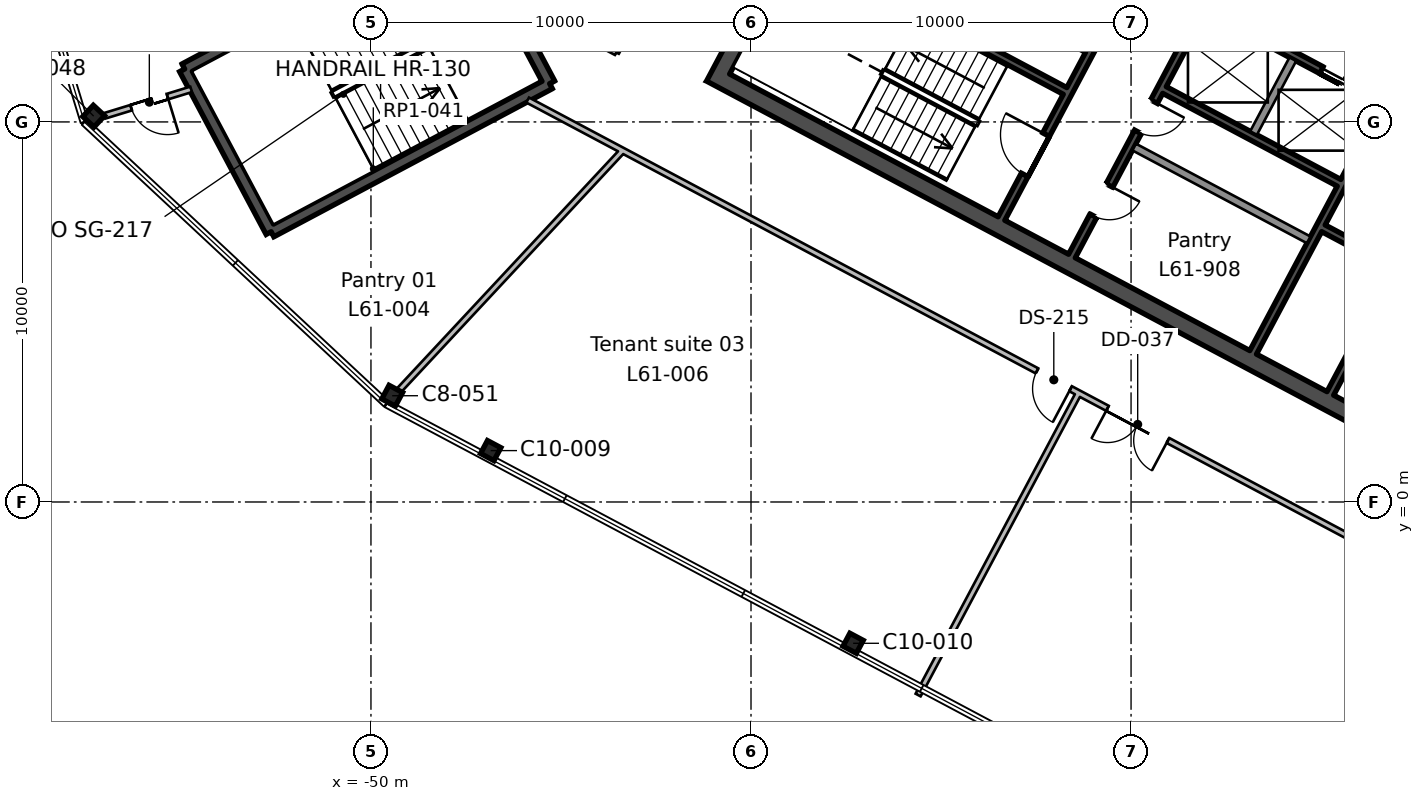
"""IFC4 building model, lengths in metres.
Left out: names, types, materials, properties, quantities, classifications, styles, units other than length and angle.
Written with IfcOpenShell. Run it as: python <this file> out.ifc"""

import sys

from ifc_helpers import new_model, si_unit, direction, frame, frame_2d, origin, origin_2d, place, context, subcontext, project, spatial, rectangle, i_section, extrude, element, fill, save


model = new_model("IFC4")
c1 = context("Model", 3, precision=1e-05, world=origin(), true_north=direction((0.0, 1.0)))
c2 = subcontext(c1, "Body", "Model", "MODEL_VIEW")
j1 = project(units=[si_unit("LENGTHUNIT", "METRE"), si_unit("PLANEANGLEUNIT", "RADIAN")], contexts=[c1])
p1 = place(None, origin())
s1 = spatial("IfcSite", under=j1, at=p1, CompositionType="ELEMENT")
p2 = place(p1, origin())
s2 = spatial("IfcBuilding", under=s1, at=p2, CompositionType="ELEMENT")
p3 = place(p2, frame((0.0, 0.0, 273.6)))
s3 = spatial("IfcBuildingStorey", under=s2, at=p3, CompositionType="ELEMENT", Elevation=273.6)
for number, where, z_axis, x_axis in (
    (1, (-37.313, -3.718, 0.0), (0.0, 0.0, 1.0), (0.883, -0.469, 0.0)),
    (2, (-46.849, 1.352, 0.0), (0.0, 0.0, 1.0), (0.883, -0.469, 0.0)),
):
    element("IfcColumn", number, at=place(p3, frame(where, z_axis=z_axis, x_axis=x_axis)), inside=s3, PredefinedType="COLUMN", context=c2, shape_type="SweptSolid", body=[
        extrude(i_section(OverallWidth=0.399, OverallDepth=0.386, WebThickness=0.021, FlangeThickness=0.033, FilletRadius=0.015, at=origin_2d()), origin(), (0.0, 0.0, 1.0), 3.9),
    ])
for number, where, z_axis, x_axis in (
    (3, (-49.441, 2.796, 0.0), (0.0, 0.0, 1.0), (0.883, -0.469, 0.0)),
    (4, (-57.296, 10.152, 0.0), (0.0, 0.0, 1.0), (0.731, -0.682, 0.0)),
):
    element("IfcColumn", number, at=place(p3, frame(where, z_axis=z_axis, x_axis=x_axis)), inside=s3, PredefinedType="COLUMN", context=c2, shape_type="SweptSolid", body=[
        extrude(i_section(OverallWidth=0.404, OverallDepth=0.406, WebThickness=0.027, FlangeThickness=0.044, FilletRadius=0.015, at=origin_2d()), origin(), (0.0, 0.0, 1.0), 3.9),
    ])
p4 = place(p3, frame((-32.004, 27.833, 0.0), z_axis=(0.0, 0.0, 1.0), x_axis=(-0.469467968382, -0.882949504028, 0.0)))
e5 = element("IfcWall", 5, at=p4, inside=s3, PredefinedType="SHEAR", context=c2, shape_type="SweptSolid", body=[
    extrude(rectangle(XDim=19.1, YDim=0.45, at=frame_2d((9.55, 0.0))), origin(), (0.0, 0.0, 1.0), 3.9),
])
p5 = place(p4, frame((10.15, 0.0, 0.0)))
e6 = element("IfcOpeningElement", 6, at=p5, cuts=e5, PredefinedType="OPENING", context=c2, shape_type="SweptSolid", body=[
    extrude(rectangle(XDim=2.4, YDim=2.4, at=frame_2d((1.2, 1.2))), frame((0.0, 0.235, 0.0), z_axis=(0.0, -1.0, 0.0), x_axis=(1.0, 0.0, 0.0)), (0.0, 0.0, 1.0), 0.47),
])
p6 = place(p3, frame((-22.832, 1.578, 0.0), z_axis=(0.0, 0.0, 1.0), x_axis=(-0.88294509198, 0.469476266226, 0.0)))
e7 = element("IfcWall", 7, at=p6, inside=s3, PredefinedType="SHEAR", context=c2, shape_type="SweptSolid", body=[
    extrude(rectangle(XDim=20.2, YDim=0.45, at=frame_2d((10.1, 0.0))), origin(), (0.0, 0.0, 1.0), 3.9),
])
p7 = place(p3, frame((-23.043, 6.08, 0.0), z_axis=(0.0, 0.0, 1.0), x_axis=(-0.469494272526, -0.882935517501, 0.0)))
e8 = element("IfcWall", 8, at=p7, inside=s3, PredefinedType="SHEAR", context=c2, shape_type="SweptSolid", body=[
    extrude(rectangle(XDim=3.65, YDim=0.2, at=frame_2d((1.825, 0.0))), origin(), (0.0, 0.0, 1.0), 3.9),
])
p8 = place(p3, frame((-23.36, 10.382, 0.0), z_axis=(0.0, 0.0, 1.0), x_axis=(-0.469480409012, -0.88294288918, 0.0)))
e9 = element("IfcWall", 9, at=p8, inside=s3, PredefinedType="SHEAR", context=c2, shape_type="SweptSolid", body=[
    extrude(rectangle(XDim=7.3, YDim=0.2, at=frame_2d((3.65, 0.0))), origin(), (0.0, 0.0, 1.0), 3.9),
])
p9 = place(p3, frame((-25.744, 11.65, 0.0), z_axis=(0.0, 0.0, 1.0), x_axis=(-0.469487830541, -0.882938942948, 0.0)))
e10 = element("IfcWall", 10, at=p9, inside=s3, PredefinedType="SOLIDWALL", context=c2, shape_type="SweptSolid", body=[
    extrude(rectangle(XDim=2.2, YDim=0.2, at=frame_2d((1.1, 0.0))), origin(), (0.0, 0.0, 1.0), 3.9),
])
p10 = place(p3, frame((-28.128, 12.917, 0.0), z_axis=(0.0, 0.0, 1.0), x_axis=(-0.469454336211, -0.882956752176, 0.0)))
e11 = element("IfcWall", 11, at=p10, inside=s3, PredefinedType="SHEAR", context=c2, shape_type="SweptSolid", body=[
    extrude(rectangle(XDim=7.3, YDim=0.2, at=frame_2d((3.65, 0.0))), origin(), (0.0, 0.0, 1.0), 3.9),
])
p11 = place(p10, frame((2.7, 0.0, 0.0)))
e12 = element("IfcOpeningElement", 12, at=p11, cuts=e11, PredefinedType="OPENING", context=c2, shape_type="SweptSolid", body=[
    extrude(rectangle(XDim=0.9, YDim=2.1, at=frame_2d((0.45, 1.05))), frame((0.0, 0.11, 0.0), z_axis=(0.0, -1.0, 0.0), x_axis=(1.0, 0.0, 0.0)), (0.0, 0.0, 1.0), 0.22),
])
p12 = place(p10, frame((5.2, 0.0, 0.0)))
e13 = element("IfcOpeningElement", 13, at=p12, cuts=e11, PredefinedType="OPENING", context=c2, shape_type="SweptSolid", body=[
    extrude(rectangle(XDim=0.9, YDim=2.1, at=frame_2d((0.45, 1.05))), frame((0.0, 0.11, 0.0), z_axis=(0.0, -1.0, 0.0), x_axis=(1.0, 0.0, 0.0)), (0.0, 0.0, 1.0), 0.22),
])
p13 = place(p3, frame((-29.982, 13.903, 0.0), z_axis=(0.0, 0.0, 1.0), x_axis=(-0.469454336211, -0.882956752176, 0.0)))
e14 = element("IfcWall", 14, at=p13, inside=s3, PredefinedType="SHEAR", context=c2, shape_type="SweptSolid", body=[
    extrude(rectangle(XDim=7.3, YDim=0.2, at=frame_2d((3.65, 0.0))), origin(), (0.0, 0.0, 1.0), 3.9),
])
p14 = place(p13, frame((4.8, 0.0, 0.0)))
e15 = element("IfcOpeningElement", 15, at=p14, cuts=e14, PredefinedType="OPENING", context=c2, shape_type="SweptSolid", body=[
    extrude(rectangle(XDim=1.2, YDim=2.1, at=frame_2d((0.6, 1.05))), frame((0.0, 0.11, 0.0), z_axis=(0.0, -1.0, 0.0), x_axis=(1.0, 0.0, 0.0)), (0.0, 0.0, 1.0), 0.22),
])
p15 = place(p3, frame((-19.252, 8.311, 0.0), z_axis=(0.0, 0.0, 1.0), x_axis=(-0.882955722218, 0.469456273365, 0.0)))
e16 = element("IfcWall", 16, at=p15, inside=s3, PredefinedType="SHEAR", context=c2, shape_type="SweptSolid", body=[
    extrude(rectangle(XDim=10.0, YDim=0.2, at=frame_2d((5.0, 0.0))), origin(), (0.0, 0.0, 1.0), 3.9),
])
p16 = place(p15, frame((2.1, 0.0, 0.0)))
e17 = element("IfcOpeningElement", 17, at=p16, cuts=e16, PredefinedType="OPENING", context=c2, shape_type="SweptSolid", body=[
    extrude(rectangle(XDim=1.2, YDim=2.1, at=frame_2d((0.6, 1.05))), frame((0.0, 0.11, 0.0), z_axis=(0.0, -1.0, 0.0), x_axis=(1.0, 0.0, 0.0)), (0.0, 0.0, 1.0), 0.22),
])
p17 = place(p15, frame((5.4, 0.0, 0.0)))
e18 = element("IfcOpeningElement", 18, at=p17, cuts=e16, PredefinedType="OPENING", context=c2, shape_type="SweptSolid", body=[
    extrude(rectangle(XDim=1.1, YDim=2.1, at=frame_2d((0.55, 1.05))), frame((0.0, 0.11, 0.0), z_axis=(0.0, -1.0, 0.0), x_axis=(1.0, 0.0, 0.0)), (0.0, 0.0, 1.0), 0.22),
])
p18 = place(p15, frame((8.1, 0.0, 0.0)))
e19 = element("IfcOpeningElement", 19, at=p18, cuts=e16, PredefinedType="OPENING", context=c2, shape_type="SweptSolid", body=[
    extrude(rectangle(XDim=1.1, YDim=2.1, at=frame_2d((0.55, 1.05))), frame((0.0, 0.11, 0.0), z_axis=(0.0, -1.0, 0.0), x_axis=(1.0, 0.0, 0.0)), (0.0, 0.0, 1.0), 0.22),
])
p19 = place(p3, frame((-24.528, 8.398, 0.0), z_axis=(0.0, 0.0, 1.0), x_axis=(-0.882953967957, 0.469459572775, 0.0)))
e20 = element("IfcWall", 20, at=p19, inside=s3, PredefinedType="SHEAR", context=c2, shape_type="SweptSolid", body=[
    extrude(rectangle(XDim=5.2, YDim=0.2, at=frame_2d((2.6, 0.0))), origin(), (0.0, 0.0, 1.0), 3.9),
])
p20 = place(p3, frame((-31.15, 11.919, 0.0), z_axis=(0.0, 0.0, 1.0), x_axis=(-0.882940221191, 0.469485426614, 0.0)))
e21 = element("IfcWall", 21, at=p20, inside=s3, PredefinedType="SHEAR", context=c2, shape_type="SweptSolid", body=[
    extrude(rectangle(XDim=8.0, YDim=0.2, at=frame_2d((4.0, 0.0))), origin(), (0.0, 0.0, 1.0), 3.9),
])
p21 = place(p3, frame((-20.965, 5.088, 0.0), z_axis=(0.0, 0.0, 1.0), x_axis=(-0.882925986334, 0.469512196493, 0.0)))
e22 = element("IfcWall", 22, at=p21, inside=s3, PredefinedType="SHEAR", context=c2, shape_type="SweptSolid", body=[
    extrude(rectangle(XDim=4.5, YDim=0.2, at=frame_2d((2.25, 0.0))), origin(), (0.0, 0.0, 1.0), 3.9),
])
p22 = place(p21, frame((0.6, 0.0, 0.0)))
e23 = element("IfcOpeningElement", 23, at=p22, cuts=e22, PredefinedType="OPENING", context=c2, shape_type="SweptSolid", body=[
    extrude(rectangle(XDim=1.1, YDim=2.1, at=frame_2d((0.55, 1.05))), frame((0.0, 0.11, 0.0), z_axis=(0.0, -1.0, 0.0), x_axis=(1.0, 0.0, 0.0)), (0.0, 0.0, 1.0), 0.22),
])
p23 = place(p3, frame((-31.737, 10.816, 0.0), z_axis=(0.0, 0.0, 1.0), x_axis=(-0.882940221191, 0.469485426614, 0.0)))
e24 = element("IfcWall", 24, at=p23, inside=s3, PredefinedType="SHEAR", context=c2, shape_type="SweptSolid", body=[
    extrude(rectangle(XDim=8.0, YDim=0.2, at=frame_2d((4.0, 0.0))), origin(), (0.0, 0.0, 1.0), 3.9),
])
p24 = place(p3, frame((-25.326, 6.897, 0.0), z_axis=(0.0, 0.0, 1.0), x_axis=(-0.882953967957, 0.469459572775, 0.0)))
e25 = element("IfcWall", 25, at=p24, inside=s3, PredefinedType="SOLIDWALL", context=c2, shape_type="SweptSolid", body=[
    extrude(rectangle(XDim=5.2, YDim=0.2, at=frame_2d((2.6, 0.0))), origin(), (0.0, 0.0, 1.0), 3.9),
])
p25 = place(p3, frame((-47.574, 15.29, 0.0), z_axis=(0.0, 0.0, 1.0), x_axis=(0.469443498566, -0.882962514297, 0.0)))
e26 = element("IfcWall", 26, at=p25, inside=s3, PredefinedType="SHEAR", context=c2, shape_type="SweptSolid", body=[
    extrude(rectangle(XDim=4.85, YDim=0.3, at=frame_2d((2.425, 0.0))), origin(), (0.0, 0.0, 1.0), 3.9),
])
p26 = place(p3, frame((-45.297, 11.007, 0.0), z_axis=(0.0, 0.0, 1.0), x_axis=(-0.882951519127, -0.469464178475, 0.0)))
e27 = element("IfcWall", 27, at=p26, inside=s3, PredefinedType="SHEAR", context=c2, shape_type="SweptSolid", body=[
    extrude(rectangle(XDim=8.3, YDim=0.3, at=frame_2d((4.15, 0.0))), origin(), (0.0, 0.0, 1.0), 3.9),
])
p27 = place(p3, frame((-52.626, 7.111, 0.0), z_axis=(0.0, 0.0, 1.0), x_axis=(-0.469464364128, 0.882951420416, 0.0)))
e28 = element("IfcWall", 28, at=p27, inside=s3, PredefinedType="SHEAR", context=c2, shape_type="SweptSolid", body=[
    extrude(rectangle(XDim=4.85, YDim=0.3, at=frame_2d((2.425, 0.0))), origin(), (0.0, 0.0, 1.0), 3.9),
])
p28 = place(p3, frame((-54.903, 11.393, 0.0), z_axis=(0.0, 0.0, 1.0), x_axis=(0.882939326045, 0.469487110071, 0.0)))
e29 = element("IfcWall", 29, at=p28, inside=s3, PredefinedType="SHEAR", context=c2, shape_type="SweptSolid", body=[
    extrude(rectangle(XDim=8.3, YDim=0.3, at=frame_2d((4.15, 0.0))), origin(), (0.0, 0.0, 1.0), 3.9),
])
p29 = place(p28, frame((6.05, 0.0, 0.0)))
e30 = element("IfcOpeningElement", 30, at=p29, cuts=e29, PredefinedType="OPENING", context=c2, shape_type="SweptSolid", body=[
    extrude(rectangle(XDim=1.9, YDim=2.1, at=frame_2d((0.95, 1.05))), frame((0.0, 0.16, 0.0), z_axis=(0.0, -1.0, 0.0), x_axis=(1.0, 0.0, 0.0)), (0.0, 0.0, 1.0), 0.32),
])
p30 = place(p3, frame((-54.732, 10.857, 0.0), z_axis=(0.0, 0.0, 1.0), x_axis=(-0.956231519395, -0.292611143525, 0.0)))
e31 = element("IfcWall", 31, at=p30, inside=s3, PredefinedType="PARTITIONING", context=c2, shape_type="SweptSolid", body=[
    extrude(rectangle(XDim=2.385, YDim=0.15, at=frame_2d((1.193, 0.0))), origin(), (0.0, 0.0, 1.0), 3.54),
])
p31 = place(p30, frame((0.65, 0.0, 0.0)))
e32 = element("IfcOpeningElement", 32, at=p31, cuts=e31, PredefinedType="OPENING", context=c2, shape_type="SweptSolid", body=[
    extrude(rectangle(XDim=1.0, YDim=2.1, at=frame_2d((0.5, 1.05))), frame((0.0, 0.085, 0.0), z_axis=(0.0, -1.0, 0.0), x_axis=(1.0, 0.0, 0.0)), (0.0, 0.0, 1.0), 0.17),
])
p32 = place(p3, frame((-43.378, 9.247, 0.0), z_axis=(0.0, 0.0, 1.0), x_axis=(-0.682017944942, -0.731335437934, 0.0)))
e33 = element("IfcWall", 33, at=p32, inside=s3, PredefinedType="PARTITIONING", context=c2, shape_type="SweptSolid", body=[
    extrude(rectangle(XDim=8.634, YDim=0.15, at=frame_2d((4.317, 0.0))), origin(), (0.0, 0.0, 1.0), 3.54),
])
p33 = place(p3, frame((-31.377, 2.866, 0.0), z_axis=(0.0, 0.0, 1.0), x_axis=(-0.469565734835, -0.88289751425, 0.0)))
e34 = element("IfcWall", 34, at=p33, inside=s3, PredefinedType="PARTITIONING", context=c2, shape_type="SweptSolid", body=[
    extrude(rectangle(XDim=9.0, YDim=0.15, at=frame_2d((4.5, 0.0))), origin(), (0.0, 0.0, 1.0), 3.54),
])
p34 = place(p3, frame((-34.155, 29.486, 0.0), z_axis=(0.0, 0.0, 1.0), x_axis=(-0.469446756585, -0.882960782103, 0.0)))
e35 = element("IfcWall", 35, at=p34, inside=s3, PredefinedType="PARTITIONING", context=c2, shape_type="SweptSolid", body=[
    extrude(rectangle(XDim=20.0, YDim=0.15, at=frame_2d((10.0, 0.0))), origin(), (0.0, 0.0, 1.0), 3.54),
])
p35 = place(p3, frame((-43.544, 11.827, 0.0), z_axis=(0.0, 0.0, 1.0), x_axis=(-0.882974130461, 0.469421649411, 0.0)))
e36 = element("IfcWall", 36, at=p35, inside=s3, PredefinedType="PARTITIONING", context=c2, shape_type="SweptSolid", body=[
    extrude(rectangle(XDim=3.238, YDim=0.15, at=frame_2d((1.619, 0.0))), origin(), (0.0, 0.0, 1.0), 3.54),
])
p36 = place(p3, frame((-13.8, -6.48, 0.0), z_axis=(0.0, 0.0, 1.0), x_axis=(-0.882943991273, 0.469478336322, 0.0)))
e37 = element("IfcWall", 37, at=p36, inside=s3, PredefinedType="PARTITIONING", context=c2, shape_type="SweptSolid", body=[
    extrude(rectangle(XDim=36.33, YDim=0.15, at=frame_2d((18.165, 0.0))), origin(), (0.0, 0.0, 1.0), 3.54),
])
p37 = place(p36, frame((20.15, 0.0, 0.0)))
e38 = element("IfcOpeningElement", 38, at=p37, cuts=e37, PredefinedType="OPENING", context=c2, shape_type="SweptSolid", body=[
    extrude(rectangle(XDim=1.0, YDim=2.1, at=frame_2d((0.5, 1.05))), frame((0.0, 0.085, 0.0), z_axis=(0.0, -1.0, 0.0), x_axis=(1.0, 0.0, 0.0)), (0.0, 0.0, 1.0), 0.17),
])
p38 = place(p36, frame((17.25, 0.0, 0.0)))
e39 = element("IfcOpeningElement", 39, at=p38, cuts=e37, PredefinedType="OPENING", context=c2, shape_type="SweptSolid", body=[
    extrude(rectangle(XDim=1.8, YDim=2.1, at=frame_2d((0.9, 1.05))), frame((0.0, 0.085, 0.0), z_axis=(0.0, -1.0, 0.0), x_axis=(1.0, 0.0, 0.0)), (0.0, 0.0, 1.0), 0.17),
])
p39 = place(p14, frame((1.2, 0.0, 0.0), z_axis=(0.0, 0.0, 1.0), x_axis=(-1.0, 0.0, 0.0)))
e40 = element("IfcDoor", 40, at=p39, inside=s3, OperationType="SINGLE_SWING_RIGHT", PredefinedType="DOOR", context=c2, shape_type="SweptSolid", body=[
    extrude(rectangle(XDim=1.2, YDim=2.1, at=frame_2d((0.6, 1.05))), frame((0.0, 0.025, 0.0), z_axis=(0.0, -1.0, 0.0), x_axis=(1.0, 0.0, 0.0)), (0.0, 0.0, 1.0), 0.05),
])
fill(e15, e40)
p40 = place(p17, origin())
e41 = element("IfcDoor", 41, at=p40, inside=s3, OperationType="DOUBLE_DOOR_SLIDING", PredefinedType="DOOR", context=c2, shape_type="SweptSolid", body=[
    extrude(rectangle(XDim=1.1, YDim=2.1, at=frame_2d((0.55, 1.05))), frame((0.0, 0.025, 0.0), z_axis=(0.0, -1.0, 0.0), x_axis=(1.0, 0.0, 0.0)), (0.0, 0.0, 1.0), 0.05),
])
fill(e18, e41)
p41 = place(p11, origin())
e42 = element("IfcDoor", 42, at=p41, inside=s3, OperationType="SINGLE_SWING_LEFT", PredefinedType="DOOR", context=c2, shape_type="SweptSolid", body=[
    extrude(rectangle(XDim=0.9, YDim=2.1, at=frame_2d((0.45, 1.05))), frame((0.0, 0.025, 0.0), z_axis=(0.0, -1.0, 0.0), x_axis=(1.0, 0.0, 0.0)), (0.0, 0.0, 1.0), 0.05),
])
fill(e12, e42)
p42 = place(p12, origin())
e43 = element("IfcDoor", 43, at=p42, inside=s3, OperationType="SINGLE_SWING_LEFT", PredefinedType="DOOR", context=c2, shape_type="SweptSolid", body=[
    extrude(rectangle(XDim=0.9, YDim=2.1, at=frame_2d((0.45, 1.05))), frame((0.0, 0.025, 0.0), z_axis=(0.0, -1.0, 0.0), x_axis=(1.0, 0.0, 0.0)), (0.0, 0.0, 1.0), 0.05),
])
fill(e13, e43)
p43 = place(p31, origin())
e44 = element("IfcDoor", 44, at=p43, inside=s3, OperationType="SINGLE_SWING_LEFT", PredefinedType="DOOR", context=c2, shape_type="SweptSolid", body=[
    extrude(rectangle(XDim=1.0, YDim=2.1, at=frame_2d((0.5, 1.05))), frame((0.0, 0.025, 0.0), z_axis=(0.0, -1.0, 0.0), x_axis=(1.0, 0.0, 0.0)), (0.0, 0.0, 1.0), 0.05),
])
fill(e32, e44)
p44 = place(p37, origin())
e45 = element("IfcDoor", 45, at=p44, inside=s3, OperationType="SINGLE_SWING_LEFT", PredefinedType="DOOR", context=c2, shape_type="SweptSolid", body=[
    extrude(rectangle(XDim=1.0, YDim=2.1, at=frame_2d((0.5, 1.05))), frame((0.0, 0.025, 0.0), z_axis=(0.0, -1.0, 0.0), x_axis=(1.0, 0.0, 0.0)), (0.0, 0.0, 1.0), 0.05),
])
fill(e38, e45)
p45 = place(p38, origin())
e46 = element("IfcDoor", 46, at=p45, inside=s3, OperationType="DOUBLE_DOOR_SINGLE_SWING", PredefinedType="DOOR", context=c2, shape_type="SweptSolid", body=[
    extrude(rectangle(XDim=1.8, YDim=2.1, at=frame_2d((0.9, 1.05))), frame((0.0, 0.025, 0.0), z_axis=(0.0, -1.0, 0.0), x_axis=(1.0, 0.0, 0.0)), (0.0, 0.0, 1.0), 0.05),
])
fill(e39, e46)
save(model, sys.argv[1])
